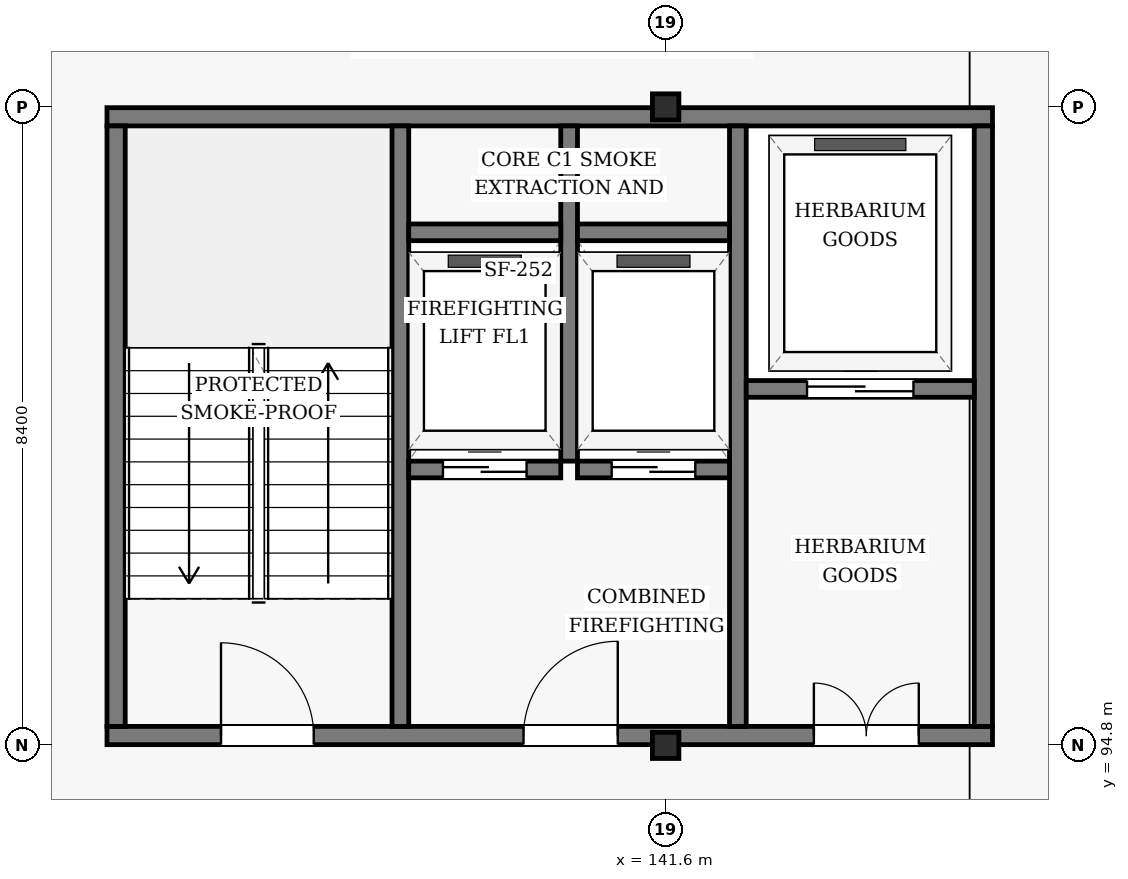
"""IFC4 building model, lengths in metres.
Left out: names, types, materials, properties, quantities, classifications, styles, units other than length and angle.
Written with IfcOpenShell. Run it as: python <this file> out.ifc"""

import sys

from ifc_helpers import new_model, si_unit, direction, frame, frame_2d, origin, origin_2d, place, context, subcontext, project, spatial, rectangle, i_section, extrude, element, fill, save


model = new_model("IFC4")
c1 = context("Model", 3, precision=1e-05, world=origin(), true_north=direction((0.0, 1.0)))
c2 = subcontext(c1, "Body", "Model", "MODEL_VIEW")
j1 = project(units=[si_unit("LENGTHUNIT", "METRE"), si_unit("PLANEANGLEUNIT", "RADIAN")], contexts=[c1])
p1 = place(None, origin())
s1 = spatial("IfcSite", under=j1, at=p1, CompositionType="ELEMENT")
p2 = place(p1, origin())
s2 = spatial("IfcBuilding", under=s1, at=p2, CompositionType="ELEMENT")
p3 = place(p2, frame((0.0, 0.0, 39.6)))
s3 = spatial("IfcBuildingStorey", under=s2, at=p3, CompositionType="ELEMENT", Elevation=39.6)
for number, where, z_axis, x_axis in (
    (1, (141.6, 94.8, 0.0), (0.0, 0.0, 1.0), (1.0, 0.0, 0.0)),
    (2, (141.6, 103.2, 0.0), (0.0, 0.0, 1.0), (1.0, 0.0, 0.0)),
):
    element("IfcColumn", number, at=place(p3, frame(where, z_axis=z_axis, x_axis=x_axis)), inside=s3, PredefinedType="COLUMN", context=c2, shape_type="SweptSolid", body=[
        extrude(i_section(OverallWidth=0.348, OverallDepth=0.344, WebThickness=0.01, FlangeThickness=0.016, FilletRadius=0.02, at=origin_2d()), origin(), (0.0, 0.0, 1.0), 3.6),
    ])
p4 = place(p3, frame((134.25, 94.93, 0.0), z_axis=(0.0, 0.0, 1.0), x_axis=(1.0, 0.0, 0.0)))
e3 = element("IfcWall", 3, at=p4, inside=s3, PredefinedType="SHEAR", context=c2, shape_type="SweptSolid", body=[
    extrude(rectangle(XDim=11.65, YDim=0.24, at=frame_2d((5.825, 0.0))), origin(), (0.0, 0.0, 1.0), 3.342),
])
p5 = place(p4, frame((1.5, 0.0, 0.0)))
e4 = element("IfcOpeningElement", 4, at=p5, cuts=e3, PredefinedType="OPENING", context=c2, shape_type="SweptSolid", body=[
    extrude(rectangle(XDim=1.22, YDim=2.18, at=frame_2d((0.61, 1.09))), frame((0.0, 0.13, 0.0), z_axis=(0.0, -1.0, 0.0), x_axis=(1.0, 0.0, 0.0)), (0.0, 0.0, 1.0), 0.26),
])
p6 = place(p4, frame((5.48, 0.0, 0.0)))
e5 = element("IfcOpeningElement", 5, at=p6, cuts=e3, PredefinedType="OPENING", context=c2, shape_type="SweptSolid", body=[
    extrude(rectangle(XDim=1.24, YDim=2.15, at=frame_2d((0.62, 1.075))), frame((0.0, 0.13, 0.0), z_axis=(0.0, -1.0, 0.0), x_axis=(1.0, 0.0, 0.0)), (0.0, 0.0, 1.0), 0.26),
])
p7 = place(p4, frame((9.3, 0.0, 0.0)))
e6 = element("IfcOpeningElement", 6, at=p7, cuts=e3, PredefinedType="OPENING", context=c2, shape_type="SweptSolid", body=[
    extrude(rectangle(XDim=1.38, YDim=2.15, at=frame_2d((0.69, 1.075))), frame((0.0, 0.13, 0.0), z_axis=(0.0, -1.0, 0.0), x_axis=(1.0, 0.0, 0.0)), (0.0, 0.0, 1.0), 0.26),
])
p8 = place(p3, frame((134.25, 103.07, 0.0), z_axis=(0.0, 0.0, 1.0), x_axis=(1.0, 0.0, 0.0)))
e7 = element("IfcWall", 7, at=p8, inside=s3, PredefinedType="SHEAR", context=c2, shape_type="SweptSolid", body=[
    extrude(rectangle(XDim=11.65, YDim=0.24, at=frame_2d((5.825, 0.0))), origin(), (0.0, 0.0, 1.0), 3.342),
])
p9 = place(p3, frame((134.37, 95.05, 0.0), z_axis=(0.0, 0.0, 1.0), x_axis=(0.0, 1.0, 0.0)))
e8 = element("IfcWall", 8, at=p9, inside=s3, PredefinedType="SHEAR", context=c2, shape_type="SweptSolid", body=[
    extrude(rectangle(XDim=7.9, YDim=0.24, at=frame_2d((3.95, 0.0))), origin(), (0.0, 0.0, 1.0), 3.342),
])
p10 = place(p3, frame((138.11, 95.05, 0.0), z_axis=(0.0, 0.0, 1.0), x_axis=(0.0, 1.0, 0.0)))
e9 = element("IfcWall", 9, at=p10, inside=s3, PredefinedType="SHEAR", context=c2, shape_type="SweptSolid", body=[
    extrude(rectangle(XDim=7.9, YDim=0.22, at=frame_2d((3.95, 0.0))), origin(), (0.0, 0.0, 1.0), 3.342),
])
p11 = place(p3, frame((140.33, 98.54, 0.0), z_axis=(0.0, 0.0, 1.0), x_axis=(0.0, 1.0, 0.0)))
e10 = element("IfcWall", 10, at=p11, inside=s3, PredefinedType="SHEAR", context=c2, shape_type="SweptSolid", body=[
    extrude(rectangle(XDim=4.41, YDim=0.22, at=frame_2d((2.205, 0.0))), origin(), (0.0, 0.0, 1.0), 3.342),
])
p12 = place(p3, frame((142.55, 95.05, 0.0), z_axis=(0.0, 0.0, 1.0), x_axis=(0.0, 1.0, 0.0)))
e11 = element("IfcWall", 11, at=p12, inside=s3, PredefinedType="SHEAR", context=c2, shape_type="SweptSolid", body=[
    extrude(rectangle(XDim=7.9, YDim=0.22, at=frame_2d((3.95, 0.0))), origin(), (0.0, 0.0, 1.0), 3.342),
])
p13 = place(p3, frame((145.78, 95.05, 0.0), z_axis=(0.0, 0.0, 1.0), x_axis=(0.0, 1.0, 0.0)))
e12 = element("IfcWall", 12, at=p13, inside=s3, PredefinedType="SHEAR", context=c2, shape_type="SweptSolid", body=[
    extrude(rectangle(XDim=7.9, YDim=0.24, at=frame_2d((3.95, 0.0))), origin(), (0.0, 0.0, 1.0), 3.342),
])
p14 = place(p3, frame((138.22, 98.43, 0.0), z_axis=(0.0, 0.0, 1.0), x_axis=(1.0, 0.0, 0.0)))
e13 = element("IfcWall", 13, at=p14, inside=s3, PredefinedType="SHEAR", context=c2, shape_type="SweptSolid", body=[
    extrude(rectangle(XDim=2.0, YDim=0.22, at=frame_2d((1.0, 0.0))), origin(), (0.0, 0.0, 1.0), 3.342),
])
p15 = place(p14, frame((0.45, 0.0, 0.0)))
e14 = element("IfcOpeningElement", 14, at=p15, cuts=e13, PredefinedType="OPENING", context=c2, shape_type="SweptSolid", body=[
    extrude(rectangle(XDim=1.1, YDim=2.15, at=frame_2d((0.55, 1.075))), frame((0.0, 0.12, 0.0), z_axis=(0.0, -1.0, 0.0), x_axis=(1.0, 0.0, 0.0)), (0.0, 0.0, 1.0), 0.24),
])
p16 = place(p3, frame((140.44, 98.43, 0.0), z_axis=(0.0, 0.0, 1.0), x_axis=(1.0, 0.0, 0.0)))
e15 = element("IfcWall", 15, at=p16, inside=s3, PredefinedType="SHEAR", context=c2, shape_type="SweptSolid", body=[
    extrude(rectangle(XDim=2.0, YDim=0.22, at=frame_2d((1.0, 0.0))), origin(), (0.0, 0.0, 1.0), 3.342),
])
p17 = place(p16, frame((0.45, 0.0, 0.0)))
e16 = element("IfcOpeningElement", 16, at=p17, cuts=e15, PredefinedType="OPENING", context=c2, shape_type="SweptSolid", body=[
    extrude(rectangle(XDim=1.1, YDim=2.15, at=frame_2d((0.55, 1.075))), frame((0.0, 0.12, 0.0), z_axis=(0.0, -1.0, 0.0), x_axis=(1.0, 0.0, 0.0)), (0.0, 0.0, 1.0), 0.24),
])
for number, where, z_axis, x_axis in (
    (17, (138.22, 101.55, 0.0), (0.0, 0.0, 1.0), (1.0, 0.0, 0.0)),
    (18, (140.44, 101.55, 0.0), (0.0, 0.0, 1.0), (1.0, 0.0, 0.0)),
):
    element("IfcWall", number, at=place(p3, frame(where, z_axis=z_axis, x_axis=x_axis)), inside=s3, PredefinedType="SHEAR", context=c2, shape_type="SweptSolid", body=[
        extrude(rectangle(XDim=2.0, YDim=0.22, at=frame_2d((1.0, 0.0))), origin(), (0.0, 0.0, 1.0), 3.342),
    ])
p18 = place(p3, frame((142.66, 99.49, 0.0), z_axis=(0.0, 0.0, 1.0), x_axis=(1.0, 0.0, 0.0)))
e19 = element("IfcWall", 19, at=p18, inside=s3, PredefinedType="SHEAR", context=c2, shape_type="SweptSolid", body=[
    extrude(rectangle(XDim=3.0, YDim=0.22, at=frame_2d((1.5, 0.0))), origin(), (0.0, 0.0, 1.0), 3.342),
])
p19 = place(p18, frame((0.8, 0.0, 0.0)))
e20 = element("IfcOpeningElement", 20, at=p19, cuts=e19, PredefinedType="OPENING", context=c2, shape_type="SweptSolid", body=[
    extrude(rectangle(XDim=1.4, YDim=2.2, at=frame_2d((0.7, 1.1))), frame((0.0, 0.12, 0.0), z_axis=(0.0, -1.0, 0.0), x_axis=(1.0, 0.0, 0.0)), (0.0, 0.0, 1.0), 0.24),
])
p20 = place(p5, origin())
e21 = element("IfcDoor", 21, at=p20, inside=s3, OperationType="SINGLE_SWING_LEFT", PredefinedType="DOOR", context=c2, shape_type="SweptSolid", body=[
    extrude(rectangle(XDim=1.22, YDim=2.18, at=frame_2d((0.61, 1.09))), frame((0.0, 0.025, 0.0), z_axis=(0.0, -1.0, 0.0), x_axis=(1.0, 0.0, 0.0)), (0.0, 0.0, 1.0), 0.05),
])
fill(e4, e21)
p21 = place(p6, frame((1.24, 0.0, 0.0), z_axis=(0.0, 0.0, 1.0), x_axis=(-1.0, 0.0, 0.0)))
e22 = element("IfcDoor", 22, at=p21, inside=s3, OperationType="SINGLE_SWING_RIGHT", PredefinedType="DOOR", context=c2, shape_type="SweptSolid", body=[
    extrude(rectangle(XDim=1.24, YDim=2.15, at=frame_2d((0.62, 1.075))), frame((0.0, 0.025, 0.0), z_axis=(0.0, -1.0, 0.0), x_axis=(1.0, 0.0, 0.0)), (0.0, 0.0, 1.0), 0.05),
])
fill(e5, e22)
p22 = place(p7, frame((1.38, 0.0, 0.0), z_axis=(0.0, 0.0, 1.0), x_axis=(-1.0, 0.0, 0.0)))
e23 = element("IfcDoor", 23, at=p22, inside=s3, OperationType="DOUBLE_DOOR_SINGLE_SWING", PredefinedType="DOOR", context=c2, shape_type="SweptSolid", body=[
    extrude(rectangle(XDim=1.38, YDim=2.15, at=frame_2d((0.69, 1.075))), frame((0.0, 0.025, 0.0), z_axis=(0.0, -1.0, 0.0), x_axis=(1.0, 0.0, 0.0)), (0.0, 0.0, 1.0), 0.05),
])
fill(e6, e23)
p23 = place(p15, origin())
e24 = element("IfcDoor", 24, at=p23, inside=s3, OperationType="SLIDING_TO_LEFT", PredefinedType="DOOR", context=c2, shape_type="SweptSolid", body=[
    extrude(rectangle(XDim=1.1, YDim=2.15, at=frame_2d((0.55, 1.075))), frame((0.0, 0.025, 0.0), z_axis=(0.0, -1.0, 0.0), x_axis=(1.0, 0.0, 0.0)), (0.0, 0.0, 1.0), 0.05),
])
fill(e14, e24)
p24 = place(p17, origin())
e25 = element("IfcDoor", 25, at=p24, inside=s3, OperationType="SLIDING_TO_LEFT", PredefinedType="DOOR", context=c2, shape_type="SweptSolid", body=[
    extrude(rectangle(XDim=1.1, YDim=2.15, at=frame_2d((0.55, 1.075))), frame((0.0, 0.025, 0.0), z_axis=(0.0, -1.0, 0.0), x_axis=(1.0, 0.0, 0.0)), (0.0, 0.0, 1.0), 0.05),
])
fill(e16, e25)
p25 = place(p19, origin())
e26 = element("IfcDoor", 26, at=p25, inside=s3, OperationType="SLIDING_TO_LEFT", PredefinedType="DOOR", context=c2, shape_type="SweptSolid", body=[
    extrude(rectangle(XDim=1.4, YDim=2.2, at=frame_2d((0.7, 1.1))), frame((0.0, 0.025, 0.0), z_axis=(0.0, -1.0, 0.0), x_axis=(1.0, 0.0, 0.0)), (0.0, 0.0, 1.0), 0.05),
])
fill(e20, e26)
save(model, sys.argv[1])
